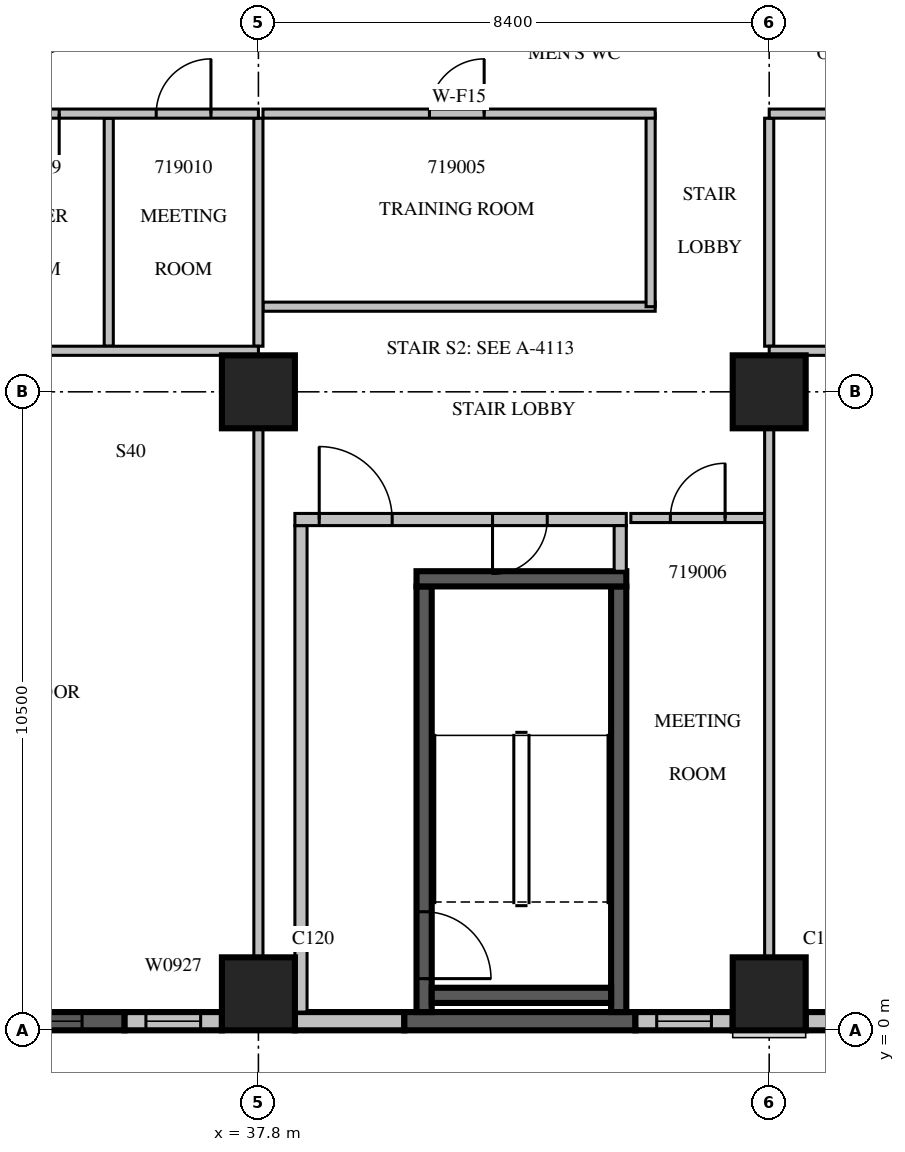
"""IFC4 building model, lengths in metres.
Left out: names, types, materials, properties, quantities, classifications, styles, units other than length and angle.
Written with IfcOpenShell. Run it as: python <this file> out.ifc"""

import sys

from ifc_helpers import new_model, si_unit, direction, frame, frame_2d, origin, origin_2d, place, context, subcontext, project, spatial, rectangle, extrude, source, transform, mapped, element, fill, save


model = new_model("IFC4")
c1 = context("Model", 3, precision=1e-05, world=origin(), true_north=direction((0.0, 1.0)))
c2 = subcontext(c1, "Body", "Model", "MODEL_VIEW")
j1 = project(units=[si_unit("LENGTHUNIT", "METRE"), si_unit("PLANEANGLEUNIT", "RADIAN")], contexts=[c1])
p1 = place(None, origin())
s1 = spatial("IfcSite", under=j1, at=p1, CompositionType="ELEMENT")
p2 = place(p1, origin())
s2 = spatial("IfcBuilding", under=s1, at=p2, CompositionType="ELEMENT")
p3 = place(p2, frame((0.0, 0.0, 90.9)))
s3 = spatial("IfcBuildingStorey", under=s2, at=p3, CompositionType="ELEMENT", Elevation=90.9)
m1 = source(origin(), c2, "Body", "SweptSolid", [
    extrude(rectangle(XDim=1.2, YDim=1.2, at=origin_2d()), origin(), (0.0, 0.0, 1.0), 4.2),
])
for number, where, z_axis, x_axis in (
    (1, (37.8, 0.6, 0.0), (0.0, 0.0, 1.0), (1.0, 0.0, 0.0)),
    (2, (46.2, 0.6, 0.0), (0.0, 0.0, 1.0), (1.0, 0.0, 0.0)),
    (3, (37.8, 10.5, 0.0), (0.0, 0.0, 1.0), (1.0, 0.0, 0.0)),
    (4, (46.2, 10.5, 0.0), (0.0, 0.0, 1.0), (1.0, 0.0, 0.0)),
):
    element("IfcColumn", number, at=place(p3, frame(where, z_axis=z_axis, x_axis=x_axis)), inside=s3, PredefinedType="COLUMN", context=c2, shape_type="MappedRepresentation", body=[
        mapped(m1, transform((0.0, 0.0, 0.0), scale=1.0)),
    ])
m2 = source(origin(), c2, "Body", "SweptSolid", [
    extrude(rectangle(XDim=3.8, YDim=0.3, at=frame_2d((1.9, 0.0))), origin(), (0.0, 0.0, 1.0), 3.8),
])
p4 = place(p3, frame((31.8, 0.15, 0.0), z_axis=(0.0, 0.0, 1.0), x_axis=(1.0, 0.0, 0.0)))
e5 = element("IfcWall", 5, at=p4, inside=s3, PredefinedType="SOLIDWALL", context=c2, shape_type="MappedRepresentation", body=[
    mapped(m2, transform((0.0, 0.0, 0.0), scale=1.0)),
])
m3 = source(origin(), c2, "Body", "SweptSolid", [
    extrude(rectangle(XDim=2.4, YDim=2.7, at=frame_2d((1.2, 1.35))), frame((0.0, 0.16, 0.0), z_axis=(0.0, -1.0, 0.0), x_axis=(1.0, 0.0, 0.0)), (0.0, 0.0, 1.0), 0.32),
])
p5 = place(p4, frame((0.7, 0.0, 0.6)))
e6 = element("IfcOpeningElement", 6, at=p5, cuts=e5, PredefinedType="OPENING", context=c2, shape_type="MappedRepresentation", body=[
    mapped(m3, transform((0.0, 0.0, 0.0), scale=1.0)),
])
m4 = source(origin(), c2, "Body", "SweptSolid", [
    extrude(rectangle(XDim=1.6, YDim=0.3, at=frame_2d((0.8, 0.0))), origin(), (0.0, 0.0, 1.0), 3.8),
])
p6 = place(p3, frame((35.6, 0.15, 0.0), z_axis=(0.0, 0.0, 1.0), x_axis=(1.0, 0.0, 0.0)))
e7 = element("IfcWall", 7, at=p6, inside=s3, PredefinedType="STANDARD", context=c2, shape_type="MappedRepresentation", body=[
    mapped(m4, transform((0.0, 0.0, 0.0), scale=1.0)),
])
m5 = source(origin(), c2, "Body", "SweptSolid", [
    extrude(rectangle(XDim=0.9, YDim=2.7, at=frame_2d((0.45, 1.35))), frame((0.0, 0.16, 0.0), z_axis=(0.0, -1.0, 0.0), x_axis=(1.0, 0.0, 0.0)), (0.0, 0.0, 1.0), 0.32),
])
p7 = place(p6, frame((0.35, 0.0, 0.6)))
e8 = element("IfcOpeningElement", 8, at=p7, cuts=e7, PredefinedType="OPENING", context=c2, shape_type="MappedRepresentation", body=[
    mapped(m5, transform((0.0, 0.0, 0.0), scale=1.0)),
])
m6 = source(origin(), c2, "Body", "SweptSolid", [
    extrude(rectangle(XDim=1.8, YDim=0.3, at=frame_2d((0.9, 0.0))), origin(), (0.0, 0.0, 1.0), 3.8),
])
p8 = place(p3, frame((38.4, 0.15, 0.0), z_axis=(0.0, 0.0, 1.0), x_axis=(1.0, 0.0, 0.0)))
e9 = element("IfcWall", 9, at=p8, inside=s3, PredefinedType="STANDARD", context=c2, shape_type="MappedRepresentation", body=[
    mapped(m6, transform((0.0, 0.0, 0.0), scale=1.0)),
])
p9 = place(p3, frame((40.2, 0.15, 0.0), z_axis=(0.0, 0.0, 1.0), x_axis=(1.0, 0.0, 0.0)))
e10 = element("IfcWall", 10, at=p9, inside=s3, PredefinedType="SOLIDWALL", context=c2, shape_type="MappedRepresentation", body=[
    mapped(m2, transform((0.0, 0.0, 0.0), scale=1.0)),
])
p10 = place(p3, frame((44.0, 0.15, 0.0), z_axis=(0.0, 0.0, 1.0), x_axis=(1.0, 0.0, 0.0)))
e11 = element("IfcWall", 11, at=p10, inside=s3, PredefinedType="STANDARD", context=c2, shape_type="MappedRepresentation", body=[
    mapped(m4, transform((0.0, 0.0, 0.0), scale=1.0)),
])
p11 = place(p10, frame((0.35, 0.0, 0.6)))
e12 = element("IfcOpeningElement", 12, at=p11, cuts=e11, PredefinedType="OPENING", context=c2, shape_type="MappedRepresentation", body=[
    mapped(m5, transform((0.0, 0.0, 0.0), scale=1.0)),
])
m7 = source(origin(), c2, "Body", "SweptSolid", [
    extrude(rectangle(XDim=4.68, YDim=0.3, at=frame_2d((2.34, 0.0))), origin(), (0.0, 0.0, 1.0), 3.3),
])
p12 = place(p3, frame((46.8, 0.15, 0.0), z_axis=(0.0, 0.0, 1.0), x_axis=(1.0, 0.0, 0.0)))
e13 = element("IfcWall", 13, at=p12, inside=s3, PredefinedType="STANDARD", context=c2, shape_type="MappedRepresentation", body=[
    mapped(m7, transform((0.0, 0.0, 0.0), scale=1.0)),
])
m8 = source(origin(), c2, "Body", "SweptSolid", [
    extrude(rectangle(XDim=3.6, YDim=2.7, at=frame_2d((1.8, 1.35))), frame((0.0, 0.16, 0.0), z_axis=(0.0, -1.0, 0.0), x_axis=(1.0, 0.0, 0.0)), (0.0, 0.0, 1.0), 0.32),
])
p13 = place(p12, frame((0.54, 0.0, 0.6)))
e14 = element("IfcOpeningElement", 14, at=p13, cuts=e13, PredefinedType="OPENING", context=c2, shape_type="MappedRepresentation", body=[
    mapped(m8, transform((0.0, 0.0, 0.0), scale=1.0)),
])
m9 = source(origin(), c2, "Body", "SweptSolid", [
    extrude(rectangle(XDim=7.0, YDim=0.25, at=frame_2d((3.5, 0.0))), origin(), (0.0, 0.0, 1.0), 3.8),
])
p14 = place(p3, frame((40.525, 0.3, 0.0), z_axis=(0.0, 0.0, 1.0), x_axis=(0.0, 1.0, 0.0)))
e15 = element("IfcWall", 15, at=p14, inside=s3, PredefinedType="SOLIDWALL", context=c2, shape_type="MappedRepresentation", body=[
    mapped(m9, transform((0.0, 0.0, 0.0), scale=1.0)),
])
m10 = source(origin(), c2, "Body", "SweptSolid", [
    extrude(rectangle(XDim=1.1, YDim=2.1, at=frame_2d((0.55, 1.05))), frame((0.0, 0.135, 0.0), z_axis=(0.0, -1.0, 0.0), x_axis=(1.0, 0.0, 0.0)), (0.0, 0.0, 1.0), 0.27),
])
p15 = place(p14, frame((0.55, 0.0, 0.0)))
e16 = element("IfcOpeningElement", 16, at=p15, cuts=e15, PredefinedType="OPENING", context=c2, shape_type="MappedRepresentation", body=[
    mapped(m10, transform((0.0, 0.0, 0.0), scale=1.0)),
])
p16 = place(p3, frame((43.725, 0.3, 0.0), z_axis=(0.0, 0.0, 1.0), x_axis=(0.0, 1.0, 0.0)))
e17 = element("IfcWall", 17, at=p16, inside=s3, PredefinedType="SOLIDWALL", context=c2, shape_type="MappedRepresentation", body=[
    mapped(m9, transform((0.0, 0.0, 0.0), scale=1.0)),
])
m11 = source(origin(), c2, "Body", "SweptSolid", [
    extrude(rectangle(XDim=3.45, YDim=0.25, at=frame_2d((1.725, 0.0))), origin(), (0.0, 0.0, 1.0), 3.8),
])
p17 = place(p3, frame((40.4, 7.425, 0.0), z_axis=(0.0, 0.0, 1.0), x_axis=(1.0, 0.0, 0.0)))
e18 = element("IfcWall", 18, at=p17, inside=s3, PredefinedType="SOLIDWALL", context=c2, shape_type="MappedRepresentation", body=[
    mapped(m11, transform((0.0, 0.0, 0.0), scale=1.0)),
])
m12 = source(origin(), c2, "Body", "SweptSolid", [
    extrude(rectangle(XDim=2.95, YDim=0.25, at=frame_2d((1.475, 0.0))), origin(), (0.0, 0.0, 1.0), 3.8),
])
p18 = place(p3, frame((40.65, 0.575, 0.0), z_axis=(0.0, 0.0, 1.0), x_axis=(1.0, 0.0, 0.0)))
e19 = element("IfcWall", 19, at=p18, inside=s3, PredefinedType="SOLIDWALL", context=c2, shape_type="MappedRepresentation", body=[
    mapped(m12, transform((0.0, 0.0, 0.0), scale=1.0)),
])
m13 = source(origin(), c2, "Body", "SweptSolid", [
    extrude(rectangle(XDim=8.0, YDim=0.2, at=frame_2d((4.0, 0.0))), origin(), (0.0, 0.0, 1.0), 3.8),
])
p19 = place(p3, frame((38.5, 0.3, 0.0), z_axis=(0.0, 0.0, 1.0), x_axis=(0.0, 1.0, 0.0)))
e20 = element("IfcWall", 20, at=p19, inside=s3, PredefinedType="PARTITIONING", context=c2, shape_type="MappedRepresentation", body=[
    mapped(m13, transform((0.0, 0.0, 0.0), scale=1.0)),
])
m14 = source(origin(), c2, "Body", "SweptSolid", [
    extrude(rectangle(XDim=5.45, YDim=0.2, at=frame_2d((2.725, 0.0))), origin(), (0.0, 0.0, 1.0), 3.8),
])
p20 = place(p3, frame((38.4, 8.4, 0.0), z_axis=(0.0, 0.0, 1.0), x_axis=(1.0, 0.0, 0.0)))
e21 = element("IfcWall", 21, at=p20, inside=s3, PredefinedType="PARTITIONING", context=c2, shape_type="MappedRepresentation", body=[
    mapped(m14, transform((0.0, 0.0, 0.0), scale=1.0)),
])
m15 = source(origin(), c2, "Body", "SweptSolid", [
    extrude(rectangle(XDim=1.2, YDim=2.1, at=frame_2d((0.6, 1.05))), frame((0.0, 0.11, 0.0), z_axis=(0.0, -1.0, 0.0), x_axis=(1.0, 0.0, 0.0)), (0.0, 0.0, 1.0), 0.22),
])
p21 = place(p20, frame((0.4, 0.0, 0.0)))
e22 = element("IfcOpeningElement", 22, at=p21, cuts=e21, PredefinedType="OPENING", context=c2, shape_type="MappedRepresentation", body=[
    mapped(m15, transform((0.0, 0.0, 0.0), scale=1.0)),
])
m16 = source(origin(), c2, "Body", "SweptSolid", [
    extrude(rectangle(XDim=0.9, YDim=2.1, at=frame_2d((0.45, 1.05))), frame((0.0, 0.11, 0.0), z_axis=(0.0, -1.0, 0.0), x_axis=(1.0, 0.0, 0.0)), (0.0, 0.0, 1.0), 0.22),
])
p22 = place(p20, frame((3.25, 0.0, 0.0)))
e23 = element("IfcOpeningElement", 23, at=p22, cuts=e21, PredefinedType="OPENING", context=c2, shape_type="MappedRepresentation", body=[
    mapped(m16, transform((0.0, 0.0, 0.0), scale=1.0)),
])
m17 = source(origin(), c2, "Body", "SweptSolid", [
    extrude(rectangle(XDim=0.75, YDim=0.2, at=frame_2d((0.375, 0.0))), origin(), (0.0, 0.0, 1.0), 3.8),
])
p23 = place(p3, frame((43.75, 7.55, 0.0), z_axis=(0.0, 0.0, 1.0), x_axis=(0.0, 1.0, 0.0)))
e24 = element("IfcWall", 24, at=p23, inside=s3, PredefinedType="PARTITIONING", context=c2, shape_type="MappedRepresentation", body=[
    mapped(m17, transform((0.0, 0.0, 0.0), scale=1.0)),
])
m18 = source(origin(), c2, "Body", "SweptSolid", [
    extrude(rectangle(XDim=6.45, YDim=0.15, at=frame_2d((3.225, 0.0))), origin(), (0.0, 0.0, 1.0), 3.8),
])
p24 = place(p3, frame((37.875, 11.9, 0.0), z_axis=(0.0, 0.0, 1.0), x_axis=(1.0, 0.0, 0.0)))
e25 = element("IfcWall", 25, at=p24, inside=s3, PredefinedType="PARTITIONING", context=c2, shape_type="MappedRepresentation", body=[
    mapped(m18, transform((0.0, 0.0, 0.0), scale=1.0)),
])
m19 = source(origin(), c2, "Body", "SweptSolid", [
    extrude(rectangle(XDim=3.175, YDim=0.15, at=frame_2d((1.587, 0.0))), origin(), (0.0, 0.0, 1.0), 3.8),
])
p25 = place(p3, frame((44.25, 11.9, 0.0), z_axis=(0.0, 0.0, 1.0), x_axis=(0.0, 1.0, 0.0)))
e26 = element("IfcWall", 26, at=p25, inside=s3, PredefinedType="PARTITIONING", context=c2, shape_type="MappedRepresentation", body=[
    mapped(m19, transform((0.0, 0.0, 0.0), scale=1.0)),
])
p26 = place(p3, frame((44.325, 15.075, 0.0), z_axis=(0.0, 0.0, 1.0), x_axis=(-1.0, 0.0, 0.0)))
e27 = element("IfcWall", 27, at=p26, inside=s3, PredefinedType="PARTITIONING", context=c2, shape_type="MappedRepresentation", body=[
    mapped(m18, transform((0.0, 0.0, 0.0), scale=1.0)),
])
m20 = source(origin(), c2, "Body", "SweptSolid", [
    extrude(rectangle(XDim=0.9, YDim=2.1, at=frame_2d((0.45, 1.05))), frame((0.0, 0.085, 0.0), z_axis=(0.0, -1.0, 0.0), x_axis=(1.0, 0.0, 0.0)), (0.0, 0.0, 1.0), 0.17),
])
p27 = place(p26, frame((2.812, 0.0, 0.0)))
e28 = element("IfcOpeningElement", 28, at=p27, cuts=e27, PredefinedType="OPENING", context=c2, shape_type="MappedRepresentation", body=[
    mapped(m20, transform((0.0, 0.0, 0.0), scale=1.0)),
])
m21 = source(origin(), c2, "Body", "SweptSolid", [
    extrude(rectangle(XDim=2.2, YDim=0.15, at=frame_2d((1.1, 0.0))), origin(), (0.0, 0.0, 1.0), 3.8),
])
p28 = place(p3, frame((46.125, 8.425, 0.0), z_axis=(0.0, 0.0, 1.0), x_axis=(-1.0, 0.0, 0.0)))
e29 = element("IfcWall", 29, at=p28, inside=s3, PredefinedType="PARTITIONING", context=c2, shape_type="MappedRepresentation", body=[
    mapped(m21, transform((0.0, 0.0, 0.0), scale=1.0)),
])
p29 = place(p28, frame((0.65, 0.0, 0.0)))
e30 = element("IfcOpeningElement", 30, at=p29, cuts=e29, PredefinedType="OPENING", context=c2, shape_type="MappedRepresentation", body=[
    mapped(m20, transform((0.0, 0.0, 0.0), scale=1.0)),
])
m22 = source(origin(), c2, "Body", "SweptSolid", [
    extrude(rectangle(XDim=3.75, YDim=0.15, at=frame_2d((1.875, 0.0))), origin(), (0.0, 0.0, 1.0), 3.8),
])
p30 = place(p3, frame((35.339, 11.25, 0.0), z_axis=(0.0, 0.0, 1.0), x_axis=(0.0, 1.0, 0.0)))
e31 = element("IfcWall", 31, at=p30, inside=s3, PredefinedType="PARTITIONING", context=c2, shape_type="MappedRepresentation", body=[
    mapped(m22, transform((0.0, 0.0, 0.0), scale=1.0)),
])
m23 = source(origin(), c2, "Body", "SweptSolid", [
    extrude(rectangle(XDim=8.702, YDim=0.15, at=frame_2d((4.351, 0.0))), origin(), (0.0, 0.0, 1.0), 3.8),
])
p31 = place(p3, frame((37.8, 1.199, 0.0), z_axis=(0.0, 0.0, 1.0), x_axis=(0.0, 1.0, 0.0)))
e32 = element("IfcWall", 32, at=p31, inside=s3, PredefinedType="PARTITIONING", context=c2, shape_type="MappedRepresentation", body=[
    mapped(m23, transform((0.0, 0.0, 0.0), scale=1.0)),
])
p32 = place(p3, frame((37.8, 11.25, 0.0), z_axis=(0.0, 0.0, 1.0), x_axis=(0.0, 1.0, 0.0)))
e33 = element("IfcWall", 33, at=p32, inside=s3, PredefinedType="PARTITIONING", context=c2, shape_type="MappedRepresentation", body=[
    mapped(m22, transform((0.0, 0.0, 0.0), scale=1.0)),
])
m24 = source(origin(), c2, "Body", "SweptSolid", [
    extrude(rectangle(XDim=8.4, YDim=0.15, at=frame_2d((4.2, 0.0))), origin(), (0.0, 0.0, 1.0), 3.8),
])
p33 = place(p3, frame((37.8, 11.175, 0.0), z_axis=(0.0, 0.0, 1.0), x_axis=(-1.0, 0.0, 0.0)))
e34 = element("IfcWall", 34, at=p33, inside=s3, PredefinedType="PARTITIONING", context=c2, shape_type="MappedRepresentation", body=[
    mapped(m24, transform((0.0, 0.0, 0.0), scale=1.0)),
])
m25 = source(origin(), c2, "Body", "SweptSolid", [
    extrude(rectangle(XDim=1.1, YDim=2.1, at=frame_2d((0.55, 1.05))), frame((0.0, 0.085, 0.0), z_axis=(0.0, -1.0, 0.0), x_axis=(1.0, 0.0, 0.0)), (0.0, 0.0, 1.0), 0.17),
])
p34 = place(p33, frame((5.833, 0.0, 0.0)))
e35 = element("IfcOpeningElement", 35, at=p34, cuts=e34, PredefinedType="OPENING", context=c2, shape_type="MappedRepresentation", body=[
    mapped(m25, transform((0.0, 0.0, 0.0), scale=1.0)),
])
p35 = place(p3, frame((46.2, 1.199, 0.0), z_axis=(0.0, 0.0, 1.0), x_axis=(0.0, 1.0, 0.0)))
e36 = element("IfcWall", 36, at=p35, inside=s3, PredefinedType="PARTITIONING", context=c2, shape_type="MappedRepresentation", body=[
    mapped(m23, transform((0.0, 0.0, 0.0), scale=1.0)),
])
p36 = place(p3, frame((46.2, 11.25, 0.0), z_axis=(0.0, 0.0, 1.0), x_axis=(0.0, 1.0, 0.0)))
e37 = element("IfcWall", 37, at=p36, inside=s3, PredefinedType="PARTITIONING", context=c2, shape_type="MappedRepresentation", body=[
    mapped(m22, transform((0.0, 0.0, 0.0), scale=1.0)),
])
m26 = source(origin(), c2, "Body", "SweptSolid", [
    extrude(rectangle(XDim=24.9, YDim=0.15, at=frame_2d((12.45, 0.0))), origin(), (0.0, 0.0, 1.0), 3.8),
])
p37 = place(p3, frame((71.1, 11.175, 0.0), z_axis=(0.0, 0.0, 1.0), x_axis=(-1.0, 0.0, 0.0)))
e38 = element("IfcWall", 38, at=p37, inside=s3, PredefinedType="PARTITIONING", context=c2, shape_type="MappedRepresentation", body=[
    mapped(m26, transform((0.0, 0.0, 0.0), scale=1.0)),
])
p38 = place(p37, frame((21.512, 0.0, 0.0)))
e39 = element("IfcOpeningElement", 39, at=p38, cuts=e38, PredefinedType="OPENING", context=c2, shape_type="MappedRepresentation", body=[
    mapped(m20, transform((0.0, 0.0, 0.0), scale=1.0)),
])
p39 = place(p37, frame((15.633, 0.0, 0.0)))
e40 = element("IfcOpeningElement", 40, at=p39, cuts=e38, PredefinedType="OPENING", context=c2, shape_type="MappedRepresentation", body=[
    mapped(m20, transform((0.0, 0.0, 0.0), scale=1.0)),
])
p40 = place(p37, frame((9.752, 0.0, 0.0)))
e41 = element("IfcOpeningElement", 41, at=p40, cuts=e38, PredefinedType="OPENING", context=c2, shape_type="MappedRepresentation", body=[
    mapped(m20, transform((0.0, 0.0, 0.0), scale=1.0)),
])
p41 = place(p3, frame((37.8, 15.075, 0.0), z_axis=(0.0, 0.0, 1.0), x_axis=(-1.0, 0.0, 0.0)))
e42 = element("IfcWall", 42, at=p41, inside=s3, PredefinedType="PARTITIONING", context=c2, shape_type="MappedRepresentation", body=[
    mapped(m24, transform((0.0, 0.0, 0.0), scale=1.0)),
])
p42 = place(p41, frame((6.146, 0.0, 0.0)))
e43 = element("IfcOpeningElement", 43, at=p42, cuts=e42, PredefinedType="OPENING", context=c2, shape_type="MappedRepresentation", body=[
    mapped(m25, transform((0.0, 0.0, 0.0), scale=1.0)),
])
p43 = place(p41, frame((3.276, 0.0, 0.0)))
e44 = element("IfcOpeningElement", 44, at=p43, cuts=e42, PredefinedType="OPENING", context=c2, shape_type="MappedRepresentation", body=[
    mapped(m20, transform((0.0, 0.0, 0.0), scale=1.0)),
])
p44 = place(p41, frame((0.781, 0.0, 0.0)))
e45 = element("IfcOpeningElement", 45, at=p44, cuts=e42, PredefinedType="OPENING", context=c2, shape_type="MappedRepresentation", body=[
    mapped(m20, transform((0.0, 0.0, 0.0), scale=1.0)),
])
p45 = place(p3, frame((71.1, 15.075, 0.0), z_axis=(0.0, 0.0, 1.0), x_axis=(-1.0, 0.0, 0.0)))
e46 = element("IfcWall", 46, at=p45, inside=s3, PredefinedType="PARTITIONING", context=c2, shape_type="MappedRepresentation", body=[
    mapped(m26, transform((0.0, 0.0, 0.0), scale=1.0)),
])
m27 = source(origin(), c2, "Body", "SweptSolid", [
    extrude(rectangle(XDim=1.2, YDim=2.1, at=frame_2d((0.6, 1.05))), frame((0.0, 0.085, 0.0), z_axis=(0.0, -1.0, 0.0), x_axis=(1.0, 0.0, 0.0)), (0.0, 0.0, 1.0), 0.17),
])
p46 = place(p45, frame((15.48, 0.0, 0.0)))
e47 = element("IfcOpeningElement", 47, at=p46, cuts=e46, PredefinedType="OPENING", context=c2, shape_type="MappedRepresentation", body=[
    mapped(m27, transform((0.0, 0.0, 0.0), scale=1.0)),
])
p47 = place(p45, frame((0.921, 0.0, 0.0)))
e48 = element("IfcOpeningElement", 48, at=p47, cuts=e46, PredefinedType="OPENING", context=c2, shape_type="MappedRepresentation", body=[
    mapped(m25, transform((0.0, 0.0, 0.0), scale=1.0)),
])
p48 = place(p45, frame((4.689, 0.0, 0.0)))
e49 = element("IfcOpeningElement", 49, at=p48, cuts=e46, PredefinedType="OPENING", context=c2, shape_type="MappedRepresentation", body=[
    mapped(m20, transform((0.0, 0.0, 0.0), scale=1.0)),
])
m28 = source(origin(), c2, "Body", "SweptSolid", [
    extrude(rectangle(XDim=2.4, YDim=2.7, at=frame_2d((1.2, 1.35))), frame((0.0, 0.03, 0.0), z_axis=(0.0, -1.0, 0.0), x_axis=(1.0, 0.0, 0.0)), (0.0, 0.0, 1.0), 0.06),
])
p49 = place(p5, origin())
e50 = element("IfcWindow", 50, at=p49, inside=s3, PartitioningType="SINGLE_PANEL", PredefinedType="WINDOW", context=c2, shape_type="MappedRepresentation", body=[
    mapped(m28, transform((0.0, 0.0, 0.0), scale=1.0)),
])
fill(e6, e50)
m29 = source(origin(), c2, "Body", "SweptSolid", [
    extrude(rectangle(XDim=0.9, YDim=2.7, at=frame_2d((0.45, 1.35))), frame((0.0, 0.03, 0.0), z_axis=(0.0, -1.0, 0.0), x_axis=(1.0, 0.0, 0.0)), (0.0, 0.0, 1.0), 0.06),
])
p50 = place(p7, origin())
e51 = element("IfcWindow", 51, at=p50, inside=s3, PartitioningType="SINGLE_PANEL", PredefinedType="WINDOW", context=c2, shape_type="MappedRepresentation", body=[
    mapped(m29, transform((0.0, 0.0, 0.0), scale=1.0)),
])
fill(e8, e51)
p51 = place(p11, origin())
e52 = element("IfcWindow", 52, at=p51, inside=s3, PartitioningType="SINGLE_PANEL", PredefinedType="WINDOW", context=c2, shape_type="MappedRepresentation", body=[
    mapped(m29, transform((0.0, 0.0, 0.0), scale=1.0)),
])
fill(e12, e52)
m30 = source(origin(), c2, "Body", "SweptSolid", [
    extrude(rectangle(XDim=1.1, YDim=2.1, at=frame_2d((0.55, 1.05))), frame((0.0, 0.025, 0.0), z_axis=(0.0, -1.0, 0.0), x_axis=(1.0, 0.0, 0.0)), (0.0, 0.0, 1.0), 0.05),
])
p52 = place(p15, origin())
e53 = element("IfcDoor", 53, at=p52, inside=s3, OperationType="SINGLE_SWING_RIGHT", PredefinedType="DOOR", context=c2, shape_type="MappedRepresentation", body=[
    mapped(m30, transform((0.0, 0.0, 0.0), scale=1.0)),
])
fill(e16, e53)
m31 = source(origin(), c2, "Body", "SweptSolid", [
    extrude(rectangle(XDim=1.2, YDim=2.1, at=frame_2d((0.6, 1.05))), frame((0.0, 0.025, 0.0), z_axis=(0.0, -1.0, 0.0), x_axis=(1.0, 0.0, 0.0)), (0.0, 0.0, 1.0), 0.05),
])
p53 = place(p21, origin())
e54 = element("IfcDoor", 54, at=p53, inside=s3, OperationType="SINGLE_SWING_LEFT", PredefinedType="DOOR", context=c2, shape_type="MappedRepresentation", body=[
    mapped(m31, transform((0.0, 0.0, 0.0), scale=1.0)),
])
fill(e22, e54)
m32 = source(origin(), c2, "Body", "SweptSolid", [
    extrude(rectangle(XDim=0.9, YDim=2.1, at=frame_2d((0.45, 1.05))), frame((0.0, 0.025, 0.0), z_axis=(0.0, -1.0, 0.0), x_axis=(1.0, 0.0, 0.0)), (0.0, 0.0, 1.0), 0.05),
])
p54 = place(p22, origin())
e55 = element("IfcDoor", 55, at=p54, inside=s3, OperationType="SINGLE_SWING_RIGHT", PredefinedType="DOOR", context=c2, shape_type="MappedRepresentation", body=[
    mapped(m32, transform((0.0, 0.0, 0.0), scale=1.0)),
])
fill(e23, e55)
p55 = place(p27, origin())
e56 = element("IfcDoor", 56, at=p55, inside=s3, OperationType="SINGLE_SWING_RIGHT", PredefinedType="DOOR", context=c2, shape_type="MappedRepresentation", body=[
    mapped(m32, transform((0.0, 0.0, 0.0), scale=1.0)),
])
fill(e28, e56)
p56 = place(p29, origin())
e57 = element("IfcDoor", 57, at=p56, inside=s3, OperationType="SINGLE_SWING_RIGHT", PredefinedType="DOOR", context=c2, shape_type="MappedRepresentation", body=[
    mapped(m32, transform((0.0, 0.0, 0.0), scale=1.0)),
])
fill(e30, e57)
p57 = place(p43, origin())
e58 = element("IfcDoor", 58, at=p57, inside=s3, OperationType="SINGLE_SWING_LEFT", PredefinedType="DOOR", context=c2, shape_type="MappedRepresentation", body=[
    mapped(m32, transform((0.0, 0.0, 0.0), scale=1.0)),
])
fill(e44, e58)
p58 = place(p44, origin())
e59 = element("IfcDoor", 59, at=p58, inside=s3, OperationType="SINGLE_SWING_RIGHT", PredefinedType="DOOR", context=c2, shape_type="MappedRepresentation", body=[
    mapped(m32, transform((0.0, 0.0, 0.0), scale=1.0)),
])
fill(e45, e59)
save(model, sys.argv[1])
